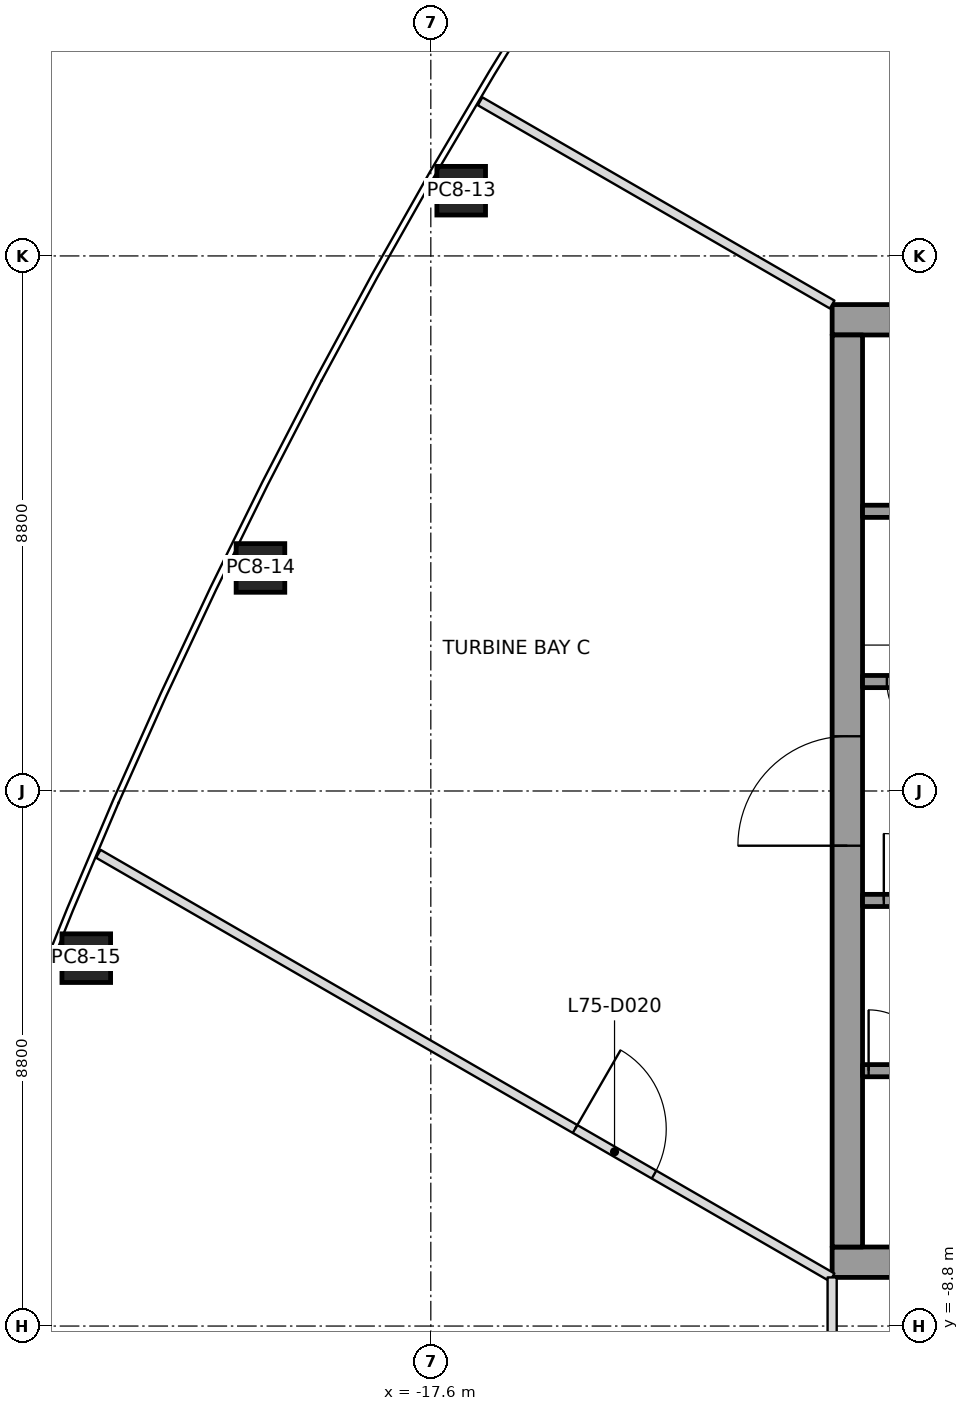
"""IFC4 building model, lengths in metres.
Left out: names, types, materials, properties, quantities, classifications, styles, units other than length and angle.
Written with IfcOpenShell. Run it as: python <this file> out.ifc"""

import sys

from ifc_helpers import new_model, si_unit, direction, frame, frame_2d, origin, origin_2d, place, context, subcontext, project, spatial, rectangle, extrude, clip, halfspace, element, fill, save


model = new_model("IFC4")
c1 = context("Model", 3, precision=1e-05, world=origin(), true_north=direction((0.0, 1.0)))
c2 = subcontext(c1, "Body", "Model", "MODEL_VIEW")
j1 = project(units=[si_unit("LENGTHUNIT", "METRE"), si_unit("PLANEANGLEUNIT", "RADIAN")], contexts=[c1])
p1 = place(None, origin())
s1 = spatial("IfcSite", under=j1, at=p1, CompositionType="ELEMENT")
p2 = place(p1, origin())
s2 = spatial("IfcBuilding", under=s1, at=p2, CompositionType="ELEMENT")
p3 = place(p2, frame((0.0, 0.0, 330.4)))
s3 = spatial("IfcBuildingStorey", under=s2, at=p3, CompositionType="ELEMENT", Elevation=330.4)
p4 = place(p3, frame((-17.1, 9.873, 0.0), z_axis=(0.004394474833, -0.002522754071, 0.999987162069), x_axis=(0.499995172124, 0.866028191052, -1.2440216e-05)))
e1 = element("IfcColumn", 1, at=p4, inside=s3, PredefinedType="COLUMN", context=c2, shape_type="SweptSolid", body=[
    clip(clip(extrude(rectangle(XDim=0.8, YDim=0.8, at=origin_2d()), origin(), (0.0, 0.0, 1.0), 9.0), halfspace(frame((0.0, 0.0, 0.001)), True)), halfspace(frame((0.0, 0.0, 8.999)), False)),
])
p5 = place(p3, frame((-20.402, 3.668, 0.0), z_axis=(0.006211900374, 0.00086803848, 0.999980329208), x_axis=(0.438919479413, 0.898519557244, -0.003506542606)))
e2 = element("IfcColumn", 2, at=p5, inside=s3, PredefinedType="COLUMN", context=c2, shape_type="SweptSolid", body=[
    clip(clip(extrude(rectangle(XDim=0.8, YDim=0.8, at=origin_2d()), origin(), (0.0, 0.0, 1.0), 9.0), halfspace(frame((0.0, 0.0, 0.001)), True)), halfspace(frame((0.0, 0.0, 8.998)), False)),
])
p6 = place(p3, frame((-23.266, -2.75, 0.0), z_axis=(0.00786643411, 0.004394352848, 0.999959403615), x_axis=(0.375745247871, 0.926696342835, -0.007028291271)))
e3 = element("IfcColumn", 3, at=p6, inside=s3, PredefinedType="COLUMN", context=c2, shape_type="SweptSolid", body=[
    clip(clip(extrude(rectangle(XDim=0.8, YDim=0.8, at=origin_2d()), origin(), (0.0, 0.0, 1.0), 9.0), halfspace(frame((0.0, 0.0, 0.002)), True)), halfspace(frame((0.0, 0.0, 8.998)), False)),
])
p7 = place(p3, frame((-11.0, -7.75, 0.0), z_axis=(0.0, 0.0, 1.0), x_axis=(1.0, 0.0, 0.0)))
e4 = element("IfcWall", 4, at=p7, inside=s3, PredefinedType="SHEAR", context=c2, shape_type="SweptSolid", body=[
    extrude(rectangle(XDim=22.0, YDim=0.5, at=frame_2d((11.0, 0.0))), origin(), (0.0, 0.0, 1.0), 9.0),
])
p8 = place(p7, frame((10.45, 0.0, 0.0)))
e5 = element("IfcOpeningElement", 5, at=p8, cuts=e4, PredefinedType="OPENING", context=c2, shape_type="SweptSolid", body=[
    extrude(rectangle(XDim=1.1, YDim=2.1, at=frame_2d((0.55, 1.05))), frame((0.0, 0.25, 0.0), z_axis=(0.0, -1.0, 0.0), x_axis=(1.0, 0.0, 0.0)), (0.0, 0.0, 1.0), 0.5),
])
p9 = place(p3, frame((-11.0, 7.75, 0.0), z_axis=(0.0, 0.0, 1.0), x_axis=(1.0, 0.0, 0.0)))
e6 = element("IfcWall", 6, at=p9, inside=s3, PredefinedType="SHEAR", context=c2, shape_type="SweptSolid", body=[
    extrude(rectangle(XDim=22.0, YDim=0.5, at=frame_2d((11.0, 0.0))), origin(), (0.0, 0.0, 1.0), 9.0),
])
p10 = place(p9, frame((10.45, 0.0, 0.0)))
e7 = element("IfcOpeningElement", 7, at=p10, cuts=e6, PredefinedType="OPENING", context=c2, shape_type="SweptSolid", body=[
    extrude(rectangle(XDim=1.1, YDim=2.1, at=frame_2d((0.55, 1.05))), frame((0.0, 0.25, 0.0), z_axis=(0.0, -1.0, 0.0), x_axis=(1.0, 0.0, 0.0)), (0.0, 0.0, 1.0), 0.5),
])
p11 = place(p3, frame((-10.75, -7.5, 0.0), z_axis=(0.0, 0.0, 1.0), x_axis=(0.0, 1.0, 0.0)))
e8 = element("IfcWall", 8, at=p11, inside=s3, PredefinedType="SHEAR", context=c2, shape_type="SweptSolid", body=[
    extrude(rectangle(XDim=15.0, YDim=0.5, at=frame_2d((7.5, 0.0))), origin(), (0.0, 0.0, 1.0), 9.0),
])
p12 = place(p11, frame((6.6, 0.0, 0.0)))
e9 = element("IfcOpeningElement", 9, at=p12, cuts=e8, PredefinedType="OPENING", context=c2, shape_type="SweptSolid", body=[
    extrude(rectangle(XDim=1.8, YDim=2.1, at=frame_2d((0.9, 1.05))), frame((0.0, 0.25, 0.0), z_axis=(0.0, -1.0, 0.0), x_axis=(1.0, 0.0, 0.0)), (0.0, 0.0, 1.0), 0.5),
])
p13 = place(p3, frame((-10.5, -4.6, 0.0), z_axis=(0.0, 0.0, 1.0), x_axis=(1.0, 0.0, 0.0)))
e10 = element("IfcWall", 10, at=p13, inside=s3, PredefinedType="SOLIDWALL", context=c2, shape_type="SweptSolid", body=[
    extrude(rectangle(XDim=1.8, YDim=0.2, at=frame_2d((0.9, 0.0))), origin(), (0.0, 0.0, 1.0), 8.85),
])
p14 = place(p13, frame((0.1, 0.0, 0.0)))
e11 = element("IfcOpeningElement", 11, at=p14, cuts=e10, PredefinedType="OPENING", context=c2, shape_type="SweptSolid", body=[
    extrude(rectangle(XDim=1.0, YDim=2.1, at=frame_2d((0.5, 1.05))), frame((0.0, 0.1, 0.0), z_axis=(0.0, -1.0, 0.0), x_axis=(1.0, 0.0, 0.0)), (0.0, 0.0, 1.0), 0.2),
])
p15 = place(p3, frame((-10.5, -1.8, 0.0), z_axis=(0.0, 0.0, 1.0), x_axis=(1.0, 0.0, 0.0)))
e12 = element("IfcWall", 12, at=p15, inside=s3, PredefinedType="SOLIDWALL", context=c2, shape_type="SweptSolid", body=[
    extrude(rectangle(XDim=1.8, YDim=0.2, at=frame_2d((0.9, 0.0))), origin(), (0.0, 0.0, 1.0), 8.85),
])
p16 = place(p15, frame((0.35, 0.0, 0.0)))
e13 = element("IfcOpeningElement", 13, at=p16, cuts=e12, PredefinedType="OPENING", context=c2, shape_type="SweptSolid", body=[
    extrude(rectangle(XDim=1.1, YDim=2.1, at=frame_2d((0.55, 1.05))), frame((0.0, 0.1, 0.0), z_axis=(0.0, -1.0, 0.0), x_axis=(1.0, 0.0, 0.0)), (0.0, 0.0, 1.0), 0.2),
])
p17 = place(p3, frame((-8.7, 1.8, 0.0), z_axis=(0.0, 0.0, 1.0), x_axis=(-1.0, 0.0, 0.0)))
e14 = element("IfcWall", 14, at=p17, inside=s3, PredefinedType="SOLIDWALL", context=c2, shape_type="SweptSolid", body=[
    extrude(rectangle(XDim=1.8, YDim=0.2, at=frame_2d((0.9, 0.0))), origin(), (0.0, 0.0, 1.0), 8.85),
])
p18 = place(p17, frame((0.4, 0.0, 0.0)))
e15 = element("IfcOpeningElement", 15, at=p18, cuts=e14, PredefinedType="OPENING", context=c2, shape_type="SweptSolid", body=[
    extrude(rectangle(XDim=1.0, YDim=2.1, at=frame_2d((0.5, 1.05))), frame((0.0, 0.1, 0.0), z_axis=(0.0, -1.0, 0.0), x_axis=(1.0, 0.0, 0.0)), (0.0, 0.0, 1.0), 0.2),
])
p19 = place(p3, frame((-8.7, 4.6, 0.0), z_axis=(0.0, 0.0, 1.0), x_axis=(-1.0, 0.0, 0.0)))
e16 = element("IfcWall", 16, at=p19, inside=s3, PredefinedType="SOLIDWALL", context=c2, shape_type="SweptSolid", body=[
    extrude(rectangle(XDim=1.8, YDim=0.2, at=frame_2d((0.9, 0.0))), origin(), (0.0, 0.0, 1.0), 8.85),
])
p20 = place(p3, frame((-23.068, -1.032, 0.0), z_axis=(0.0, 0.0, 1.0), x_axis=(0.866022206254, -0.500005538244, 0.0)))
e17 = element("IfcWall", 17, at=p20, inside=s3, PredefinedType="PARTITIONING", context=c2, shape_type="SweptSolid", body=[
    extrude(rectangle(XDim=13.935, YDim=0.15, at=frame_2d((6.968, 0.0))), origin(), (0.0, 0.0, 1.0), 8.083),
])
p21 = place(p20, frame((9.053, 0.0, 0.0)))
e18 = element("IfcOpeningElement", 18, at=p21, cuts=e17, PredefinedType="OPENING", context=c2, shape_type="SweptSolid", body=[
    extrude(rectangle(XDim=1.5, YDim=2.1, at=frame_2d((0.75, 1.05))), frame((0.0, 0.075, 0.0), z_axis=(0.0, -1.0, 0.0), x_axis=(1.0, 0.0, 0.0)), (0.0, 0.0, 1.0), 0.15),
])
p22 = place(p3, frame((-11.0, -8.0, 0.0), z_axis=(0.0, 0.0, 1.0), x_axis=(0.0, -1.0, 0.0)))
e19 = element("IfcWall", 19, at=p22, inside=s3, PredefinedType="PARTITIONING", context=c2, shape_type="SweptSolid", body=[
    extrude(rectangle(XDim=11.628, YDim=0.15, at=frame_2d((5.814, 0.0))), origin(), (0.0, 0.0, 1.0), 8.083),
])
p23 = place(p3, frame((-11.0, 8.001, 0.0), z_axis=(0.0, 0.0, 1.0), x_axis=(-0.866041473349, 0.499972165665, 0.0)))
e20 = element("IfcWall", 20, at=p23, inside=s3, PredefinedType="PARTITIONING", context=c2, shape_type="SweptSolid", body=[
    extrude(rectangle(XDim=6.686, YDim=0.15, at=frame_2d((3.343, 0.0))), origin(), (0.0, 0.0, 1.0), 8.083),
])
p24 = place(p21, origin())
e21 = element("IfcDoor", 21, at=p24, inside=s3, OperationType="DOUBLE_DOOR_SINGLE_SWING", PredefinedType="DOOR", context=c2, shape_type="SweptSolid", body=[
    extrude(rectangle(XDim=1.5, YDim=2.1, at=frame_2d((0.75, 1.05))), frame((0.0, 0.025, 0.0), z_axis=(0.0, -1.0, 0.0), x_axis=(1.0, 0.0, 0.0)), (0.0, 0.0, 1.0), 0.05),
])
fill(e18, e21)
p25 = place(p16, origin())
e22 = element("IfcDoor", 22, at=p25, inside=s3, OperationType="SINGLE_SWING_RIGHT", PredefinedType="DOOR", context=c2, shape_type="SweptSolid", body=[
    extrude(rectangle(XDim=1.1, YDim=2.1, at=frame_2d((0.55, 1.05))), frame((0.0, 0.025, 0.0), z_axis=(0.0, -1.0, 0.0), x_axis=(1.0, 0.0, 0.0)), (0.0, 0.0, 1.0), 0.05),
])
fill(e13, e22)
p26 = place(p18, origin())
e23 = element("IfcDoor", 23, at=p26, inside=s3, OperationType="SINGLE_SWING_LEFT", PredefinedType="DOOR", context=c2, shape_type="SweptSolid", body=[
    extrude(rectangle(XDim=1.0, YDim=2.1, at=frame_2d((0.5, 1.05))), frame((0.0, 0.025, 0.0), z_axis=(0.0, -1.0, 0.0), x_axis=(1.0, 0.0, 0.0)), (0.0, 0.0, 1.0), 0.05),
])
fill(e15, e23)
p27 = place(p14, origin())
e24 = element("IfcDoor", 24, at=p27, inside=s3, OperationType="SINGLE_SWING_LEFT", PredefinedType="DOOR", context=c2, shape_type="SweptSolid", body=[
    extrude(rectangle(XDim=1.0, YDim=2.1, at=frame_2d((0.5, 1.05))), frame((0.0, 0.025, 0.0), z_axis=(0.0, -1.0, 0.0), x_axis=(1.0, 0.0, 0.0)), (0.0, 0.0, 1.0), 0.05),
])
fill(e11, e24)
p28 = place(p12, origin())
e25 = element("IfcDoor", 25, at=p28, inside=s3, OperationType="DOUBLE_DOOR_SINGLE_SWING", PredefinedType="DOOR", context=c2, shape_type="SweptSolid", body=[
    extrude(rectangle(XDim=1.8, YDim=2.1, at=frame_2d((0.9, 1.05))), frame((0.0, 0.025, 0.0), z_axis=(0.0, -1.0, 0.0), x_axis=(1.0, 0.0, 0.0)), (0.0, 0.0, 1.0), 0.05),
])
fill(e9, e25)
save(model, sys.argv[1])
